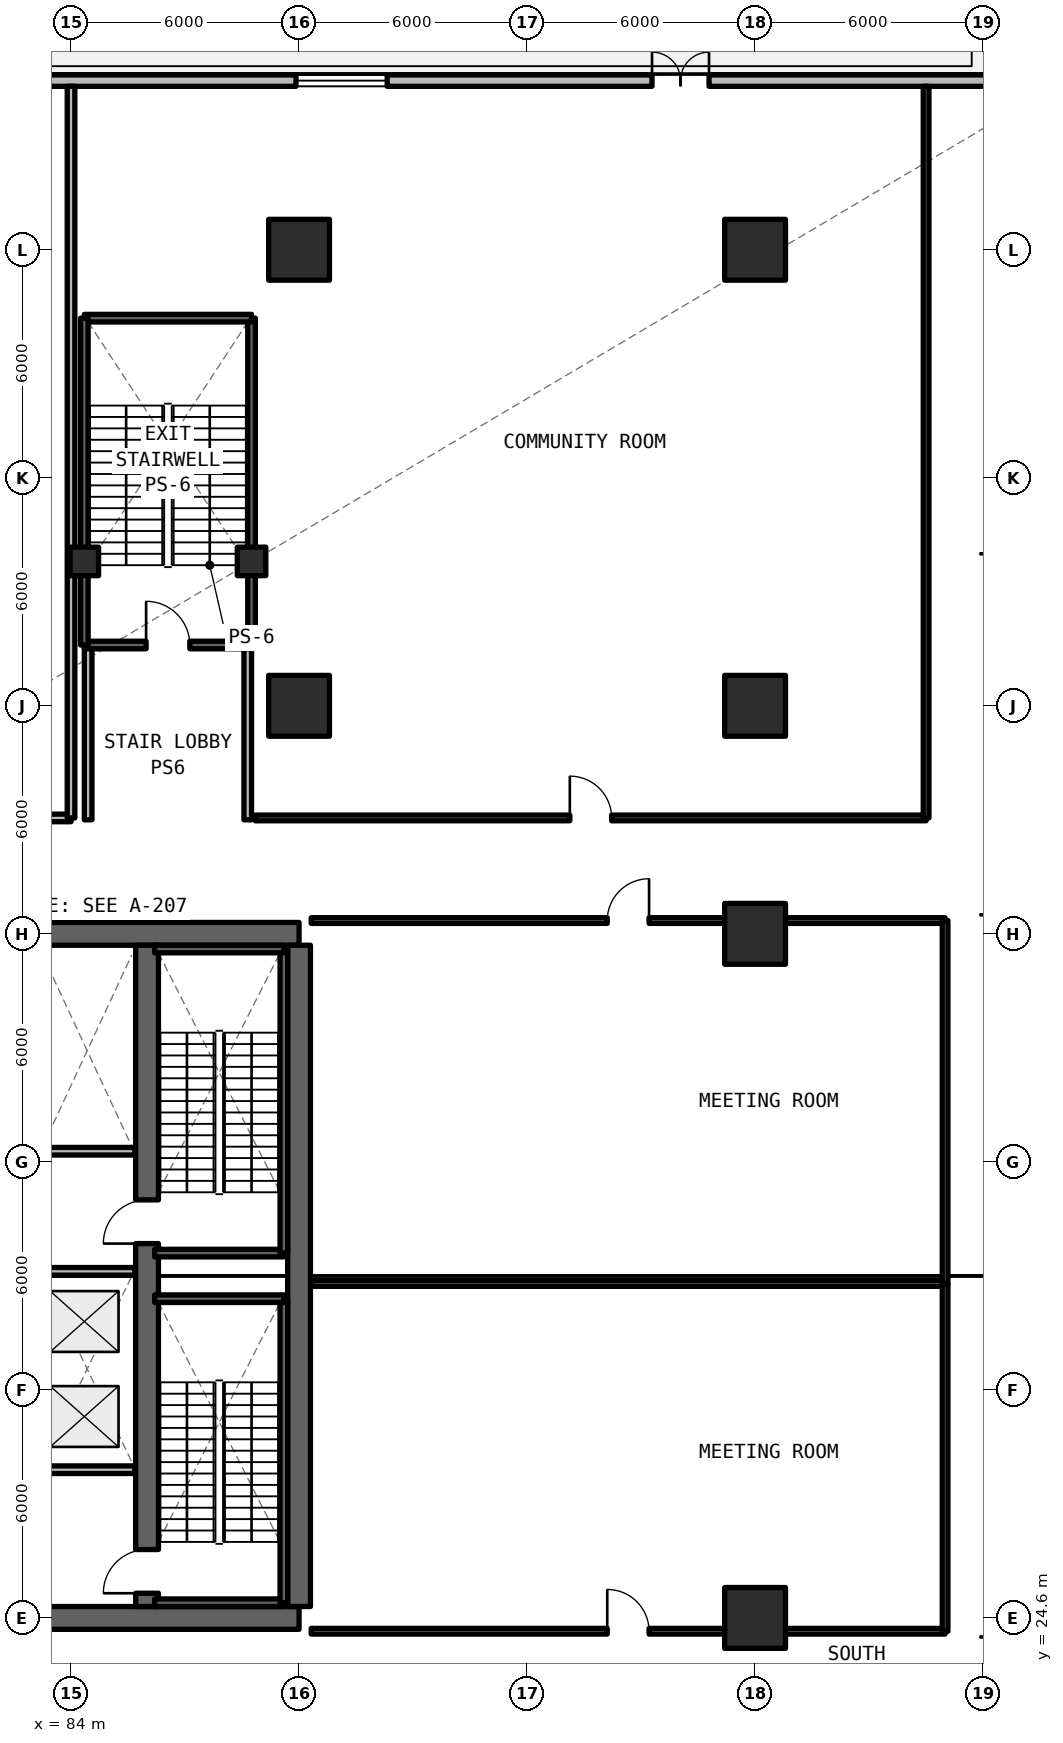
"""IFC4 building model, lengths in metres.
Left out: names, types, materials, properties, quantities, classifications, styles, units other than length and angle.
Written with IfcOpenShell. Run it as: python <this file> out.ifc"""

import sys

from ifc_helpers import new_model, si_unit, direction, frame, frame_2d, origin, origin_2d, place, context, subcontext, project, spatial, rectangle, extrude, element, fill, save


model = new_model("IFC4")
c1 = context("Model", 3, precision=1e-05, world=origin(), true_north=direction((0.0, 1.0)))
c2 = subcontext(c1, "Body", "Model", "MODEL_VIEW")
j1 = project(units=[si_unit("LENGTHUNIT", "METRE"), si_unit("PLANEANGLEUNIT", "RADIAN")], contexts=[c1])
p1 = place(None, origin())
s1 = spatial("IfcSite", under=j1, at=p1, CompositionType="ELEMENT")
p2 = place(p1, origin())
s2 = spatial("IfcBuilding", under=s1, at=p2, CompositionType="ELEMENT")
p3 = place(p2, frame((0.0, 0.0, 9.9)))
s3 = spatial("IfcBuildingStorey", under=s2, at=p3, CompositionType="ELEMENT", Elevation=9.9)
for number, where, z_axis, x_axis in (
    (1, (78.0, 24.6, 0.0), (0.0, 0.0, 1.0), (1.0, 0.0, 0.0)),
    (2, (90.0, 42.6, 0.0), (0.0, 0.0, 1.0), (-1.0, 0.0, 0.0)),
):
    element("IfcWall", number, at=place(p3, frame(where, z_axis=z_axis, x_axis=x_axis)), inside=s3, PredefinedType="SHEAR", context=c2, shape_type="SweptSolid", body=[
        extrude(rectangle(XDim=12.0, YDim=0.6, at=frame_2d((6.0, 0.0))), origin(), (0.0, 0.0, 1.0), 4.95),
    ])
p4 = place(p3, frame((90.0, 24.9, 0.0), z_axis=(0.0, 0.0, 1.0), x_axis=(0.0, 1.0, 0.0)))
e3 = element("IfcWall", 3, at=p4, inside=s3, PredefinedType="SHEAR", context=c2, shape_type="SweptSolid", body=[
    extrude(rectangle(XDim=17.4, YDim=0.6, at=frame_2d((8.7, 0.0))), origin(), (0.0, 0.0, 1.0), 4.95),
])
p5 = place(p3, frame((86.0, 24.9, 0.0), z_axis=(0.0, 0.0, 1.0), x_axis=(0.0, 1.0, 0.0)))
e4 = element("IfcWall", 4, at=p5, inside=s3, PredefinedType="SHEAR", context=c2, shape_type="SweptSolid", body=[
    extrude(rectangle(XDim=17.4, YDim=0.6, at=frame_2d((8.7, 0.0))), origin(), (0.0, 0.0, 1.0), 4.95),
])
p6 = place(p5, frame((0.35, 0.0, 0.0)))
e5 = element("IfcOpeningElement", 5, at=p6, cuts=e4, PredefinedType="OPENING", context=c2, shape_type="SweptSolid", body=[
    extrude(rectangle(XDim=1.15, YDim=2.15, at=frame_2d((0.575, 1.075))), frame((0.0, 0.31, 0.0), z_axis=(0.0, -1.0, 0.0), x_axis=(1.0, 0.0, 0.0)), (0.0, 0.0, 1.0), 0.62),
])
p7 = place(p5, frame((9.55, 0.0, 0.0)))
e6 = element("IfcOpeningElement", 6, at=p7, cuts=e4, PredefinedType="OPENING", context=c2, shape_type="SweptSolid", body=[
    extrude(rectangle(XDim=1.15, YDim=2.15, at=frame_2d((0.575, 1.075))), frame((0.0, 0.31, 0.0), z_axis=(0.0, -1.0, 0.0), x_axis=(1.0, 0.0, 0.0)), (0.0, 0.0, 1.0), 0.62),
])
for number, where, z_axis, x_axis in (
    (7, (90.0, 60.6, 0.0), (0.0, 0.0, 1.0), (1.0, 0.0, 0.0)),
    (8, (102.0, 24.6, 0.0), (0.0, 0.0, 1.0), (1.0, 0.0, 0.0)),
    (9, (102.0, 42.6, 0.0), (0.0, 0.0, 1.0), (1.0, 0.0, 0.0)),
    (10, (102.0, 60.6, 0.0), (0.0, 0.0, 1.0), (1.0, 0.0, 0.0)),
    (11, (90.0, 48.6, 0.0), (0.0, 0.0, 1.0), (1.0, 0.0, 0.0)),
    (12, (102.0, 48.6, 0.0), (0.0, 0.0, 1.0), (1.0, 0.0, 0.0)),
):
    element("IfcColumn", number, at=place(p3, frame(where, z_axis=z_axis, x_axis=x_axis)), inside=s3, PredefinedType="COLUMN", context=c2, shape_type="SweptSolid", body=[
        extrude(rectangle(XDim=1.6, YDim=1.6, at=origin_2d()), origin(), (0.0, 0.0, 1.0), 4.95),
    ])
for number, where, z_axis, x_axis in (
    (13, (84.35, 52.4, 0.0), (0.0, 0.0, 1.0), (1.0, 0.0, 0.0)),
    (14, (88.75, 52.4, 0.0), (0.0, 0.0, 1.0), (1.0, 0.0, 0.0)),
):
    element("IfcColumn", number, at=place(p3, frame(where, z_axis=z_axis, x_axis=x_axis)), inside=s3, PredefinedType="COLUMN", context=c2, shape_type="SweptSolid", body=[
        extrude(rectangle(XDim=0.75, YDim=0.75, at=origin_2d()), origin(), (0.0, 0.0, 1.0), 4.95),
    ])
p8 = place(p3, frame((108.538, 65.05, 0.0), z_axis=(0.0, 0.0, 1.0), x_axis=(-1.0, 0.0, 0.0)))
e15 = element("IfcWall", 15, at=p8, inside=s3, PredefinedType="SOLIDWALL", context=c2, shape_type="SweptSolid", body=[
    extrude(rectangle(XDim=44.338, YDim=0.3, at=frame_2d((22.169, 0.0))), origin(), (0.0, 0.0, 1.0), 4.67),
])
p9 = place(p8, frame((7.75, 0.0, 0.0)))
e16 = element("IfcOpeningElement", 16, at=p9, cuts=e15, PredefinedType="OPENING", context=c2, shape_type="SweptSolid", body=[
    extrude(rectangle(XDim=1.5, YDim=2.2, at=frame_2d((0.75, 1.1))), frame((0.0, 0.16, 0.0), z_axis=(0.0, -1.0, 0.0), x_axis=(1.0, 0.0, 0.0)), (0.0, 0.0, 1.0), 0.32),
])
p10 = place(p8, frame((42.913, 0.0, 0.78)))
e17 = element("IfcOpeningElement", 17, at=p10, cuts=e15, PredefinedType="OPENING", context=c2, shape_type="SweptSolid", body=[
    extrude(rectangle(XDim=0.85, YDim=1.65, at=frame_2d((0.425, 0.825))), frame((0.0, 0.16, 0.0), z_axis=(0.0, -1.0, 0.0), x_axis=(1.0, 0.0, 0.0)), (0.0, 0.0, 1.0), 0.32),
])
p11 = place(p8, frame((29.738, 0.0, 0.78)))
e18 = element("IfcOpeningElement", 18, at=p11, cuts=e15, PredefinedType="OPENING", context=c2, shape_type="SweptSolid", body=[
    extrude(rectangle(XDim=2.4, YDim=1.66, at=frame_2d((1.2, 0.83))), frame((0.0, 0.16, 0.0), z_axis=(0.0, -1.0, 0.0), x_axis=(1.0, 0.0, 0.0)), (0.0, 0.0, 1.0), 0.32),
])
p12 = place(p8, frame((38.638, 0.0, 0.78)))
e19 = element("IfcOpeningElement", 19, at=p12, cuts=e15, PredefinedType="OPENING", context=c2, shape_type="SweptSolid", body=[
    extrude(rectangle(XDim=2.4, YDim=1.66, at=frame_2d((1.2, 0.83))), frame((0.0, 0.16, 0.0), z_axis=(0.0, -1.0, 0.0), x_axis=(1.0, 0.0, 0.0)), (0.0, 0.0, 1.0), 0.32),
])
p13 = place(p8, frame((16.219, 0.0, 0.78)))
e20 = element("IfcOpeningElement", 20, at=p13, cuts=e15, PredefinedType="OPENING", context=c2, shape_type="SweptSolid", body=[
    extrude(rectangle(XDim=2.4, YDim=1.66, at=frame_2d((1.2, 0.83))), frame((0.0, 0.16, 0.0), z_axis=(0.0, -1.0, 0.0), x_axis=(1.0, 0.0, 0.0)), (0.0, 0.0, 1.0), 0.32),
])
p14 = place(p8, frame((25.719, 0.0, 0.78)))
e21 = element("IfcOpeningElement", 21, at=p14, cuts=e15, PredefinedType="OPENING", context=c2, shape_type="SweptSolid", body=[
    extrude(rectangle(XDim=2.4, YDim=1.66, at=frame_2d((1.2, 0.83))), frame((0.0, 0.16, 0.0), z_axis=(0.0, -1.0, 0.0), x_axis=(1.0, 0.0, 0.0)), (0.0, 0.0, 1.0), 0.32),
])
p15 = place(p3, frame((78.32, 28.5, 0.0), z_axis=(0.0, 0.0, 1.0), x_axis=(1.0, 0.0, 0.0)))
e22 = element("IfcWall", 22, at=p15, inside=s3, PredefinedType="SOLIDWALL", context=c2, shape_type="SweptSolid", body=[
    extrude(rectangle(XDim=7.36, YDim=0.2, at=frame_2d((3.68, 0.0))), origin(), (0.0, 0.0, 1.0), 3.89),
])
p16 = place(p15, frame((3.48, 0.0, 0.0)))
e23 = element("IfcOpeningElement", 23, at=p16, cuts=e22, PredefinedType="OPENING", context=c2, shape_type="SweptSolid", body=[
    extrude(rectangle(XDim=1.0, YDim=2.15, at=frame_2d((0.5, 1.075))), frame((0.0, 0.11, 0.0), z_axis=(0.0, -1.0, 0.0), x_axis=(1.0, 0.0, 0.0)), (0.0, 0.0, 1.0), 0.22),
])
for number, where, z_axis, x_axis in (
    (24, (83.2, 33.72, 0.0), (0.0, 0.0, 1.0), (1.0, 0.0, 0.0)),
    (25, (83.2, 36.88, 0.0), (0.0, 0.0, 1.0), (1.0, 0.0, 0.0)),
):
    element("IfcWall", number, at=place(p3, frame(where, z_axis=z_axis, x_axis=x_axis)), inside=s3, PredefinedType="SOLIDWALL", context=c2, shape_type="SweptSolid", body=[
        extrude(rectangle(XDim=2.48, YDim=0.2, at=frame_2d((1.24, 0.0))), origin(), (0.0, 0.0, 1.0), 3.89),
    ])
for number, where, z_axis, x_axis in (
    (26, (84.45, 45.6, 0.0), (0.0, 0.0, 1.0), (0.0, 1.0, 0.0)),
    (27, (88.65, 45.6, 0.0), (0.0, 0.0, 1.0), (0.0, 1.0, 0.0)),
):
    element("IfcWall", number, at=place(p3, frame(where, z_axis=z_axis, x_axis=x_axis)), inside=s3, PredefinedType="SOLIDWALL", context=c2, shape_type="SweptSolid", body=[
        extrude(rectangle(XDim=4.6, YDim=0.2, at=frame_2d((2.3, 0.0))), origin(), (0.0, 0.0, 1.0), 3.89),
    ])
p17 = place(p3, frame((71.2, 45.65, 0.0), z_axis=(0.0, 0.0, 1.0), x_axis=(1.0, 0.0, 0.0)))
e28 = element("IfcWall", 28, at=p17, inside=s3, PredefinedType="SOLIDWALL", context=c2, shape_type="SweptSolid", body=[
    extrude(rectangle(XDim=12.8, YDim=0.2, at=frame_2d((6.4, 0.0))), origin(), (0.0, 0.0, 1.0), 3.89),
])
p18 = place(p17, frame((5.9, 0.0, 0.0)))
e29 = element("IfcOpeningElement", 29, at=p18, cuts=e28, PredefinedType="OPENING", context=c2, shape_type="SweptSolid", body=[
    extrude(rectangle(XDim=1.0, YDim=2.15, at=frame_2d((0.5, 1.075))), frame((0.0, 0.11, 0.0), z_axis=(0.0, -1.0, 0.0), x_axis=(1.0, 0.0, 0.0)), (0.0, 0.0, 1.0), 0.22),
])
p19 = place(p3, frame((84.0, 45.65, 0.0), z_axis=(0.0, 0.0, 1.0), x_axis=(0.0, 1.0, 0.0)))
e30 = element("IfcWall", 30, at=p19, inside=s3, PredefinedType="SOLIDWALL", context=c2, shape_type="SweptSolid", body=[
    extrude(rectangle(XDim=19.25, YDim=0.2, at=frame_2d((9.625, 0.0))), origin(), (0.0, 0.0, 1.0), 3.89),
])
p20 = place(p3, frame((90.32, 24.25, 0.0), z_axis=(0.0, 0.0, 1.0), x_axis=(1.0, 0.0, 0.0)))
e31 = element("IfcWall", 31, at=p20, inside=s3, PredefinedType="SOLIDWALL", context=c2, shape_type="SweptSolid", body=[
    extrude(rectangle(XDim=16.68, YDim=0.15, at=frame_2d((8.34, 0.0))), origin(), (0.0, 0.0, 1.0), 3.89),
])
p21 = place(p20, frame((7.79, 0.0, 0.0)))
e32 = element("IfcOpeningElement", 32, at=p21, cuts=e31, PredefinedType="OPENING", context=c2, shape_type="SweptSolid", body=[
    extrude(rectangle(XDim=1.1, YDim=2.15, at=frame_2d((0.55, 1.075))), frame((0.0, 0.085, 0.0), z_axis=(0.0, -1.0, 0.0), x_axis=(1.0, 0.0, 0.0)), (0.0, 0.0, 1.0), 0.17),
])
p22 = place(p3, frame((90.32, 33.4, 0.0), z_axis=(0.0, 0.0, 1.0), x_axis=(1.0, 0.0, 0.0)))
e33 = element("IfcWall", 33, at=p22, inside=s3, PredefinedType="SOLIDWALL", context=c2, shape_type="SweptSolid", body=[
    extrude(rectangle(XDim=16.68, YDim=0.15, at=frame_2d((8.34, 0.0))), origin(), (0.0, 0.0, 1.0), 3.89),
])
p23 = place(p3, frame((107.0, 24.25, 0.0), z_axis=(0.0, 0.0, 1.0), x_axis=(0.0, 1.0, 0.0)))
e34 = element("IfcWall", 34, at=p23, inside=s3, PredefinedType="SOLIDWALL", context=c2, shape_type="SweptSolid", body=[
    extrude(rectangle(XDim=9.15, YDim=0.15, at=frame_2d((4.575, 0.0))), origin(), (0.0, 0.0, 1.0), 3.89),
])
p24 = place(p3, frame((90.32, 42.95, 0.0), z_axis=(0.0, 0.0, 1.0), x_axis=(1.0, 0.0, 0.0)))
e35 = element("IfcWall", 35, at=p24, inside=s3, PredefinedType="SOLIDWALL", context=c2, shape_type="SweptSolid", body=[
    extrude(rectangle(XDim=16.68, YDim=0.15, at=frame_2d((8.34, 0.0))), origin(), (0.0, 0.0, 1.0), 3.89),
])
p25 = place(p24, frame((7.79, 0.0, 0.0)))
e36 = element("IfcOpeningElement", 36, at=p25, cuts=e35, PredefinedType="OPENING", context=c2, shape_type="SweptSolid", body=[
    extrude(rectangle(XDim=1.1, YDim=2.15, at=frame_2d((0.55, 1.075))), frame((0.0, 0.085, 0.0), z_axis=(0.0, -1.0, 0.0), x_axis=(1.0, 0.0, 0.0)), (0.0, 0.0, 1.0), 0.17),
])
p26 = place(p3, frame((107.0, 33.4, 0.0), z_axis=(0.0, 0.0, 1.0), x_axis=(0.0, 1.0, 0.0)))
e37 = element("IfcWall", 37, at=p26, inside=s3, PredefinedType="SOLIDWALL", context=c2, shape_type="SweptSolid", body=[
    extrude(rectangle(XDim=9.55, YDim=0.15, at=frame_2d((4.775, 0.0))), origin(), (0.0, 0.0, 1.0), 3.89),
])
p27 = place(p3, frame((88.85, 45.65, 0.0), z_axis=(0.0, 0.0, 1.0), x_axis=(1.0, 0.0, 0.0)))
e38 = element("IfcWall", 38, at=p27, inside=s3, PredefinedType="SOLIDWALL", context=c2, shape_type="SweptSolid", body=[
    extrude(rectangle(XDim=17.65, YDim=0.15, at=frame_2d((8.825, 0.0))), origin(), (0.0, 0.0, 1.0), 3.89),
])
p28 = place(p27, frame((8.275, 0.0, 0.0)))
e39 = element("IfcOpeningElement", 39, at=p28, cuts=e38, PredefinedType="OPENING", context=c2, shape_type="SweptSolid", body=[
    extrude(rectangle(XDim=1.1, YDim=2.15, at=frame_2d((0.55, 1.075))), frame((0.0, 0.085, 0.0), z_axis=(0.0, -1.0, 0.0), x_axis=(1.0, 0.0, 0.0)), (0.0, 0.0, 1.0), 0.17),
])
p29 = place(p3, frame((106.5, 45.65, 0.0), z_axis=(0.0, 0.0, 1.0), x_axis=(0.0, 1.0, 0.0)))
e40 = element("IfcWall", 40, at=p29, inside=s3, PredefinedType="SOLIDWALL", context=c2, shape_type="SweptSolid", body=[
    extrude(rectangle(XDim=19.25, YDim=0.15, at=frame_2d((9.625, 0.0))), origin(), (0.0, 0.0, 1.0), 3.89),
])
p30 = place(p3, frame((86.2, 25.0, 0.0), z_axis=(0.0, 0.0, 1.0), x_axis=(1.0, 0.0, 0.0)))
e41 = element("IfcWall", 41, at=p30, inside=s3, PredefinedType="SOLIDWALL", context=c2, shape_type="SweptSolid", body=[
    extrude(rectangle(XDim=3.4, YDim=0.2, at=frame_2d((1.7, 0.0))), origin(), (0.0, 0.0, 1.0), 4.95),
])
p31 = place(p3, frame((89.6, 25.0, 0.0), z_axis=(0.0, 0.0, 1.0), x_axis=(0.0, 1.0, 0.0)))
e42 = element("IfcWall", 42, at=p31, inside=s3, PredefinedType="SOLIDWALL", context=c2, shape_type="SweptSolid", body=[
    extrude(rectangle(XDim=8.0, YDim=0.2, at=frame_2d((4.0, 0.0))), origin(), (0.0, 0.0, 1.0), 4.95),
])
for number, where, z_axis, x_axis in (
    (43, (89.6, 33.0, 0.0), (0.0, 0.0, 1.0), (-1.0, 0.0, 0.0)),
    (44, (86.2, 34.2, 0.0), (0.0, 0.0, 1.0), (1.0, 0.0, 0.0)),
):
    element("IfcWall", number, at=place(p3, frame(where, z_axis=z_axis, x_axis=x_axis)), inside=s3, PredefinedType="SOLIDWALL", context=c2, shape_type="SweptSolid", body=[
        extrude(rectangle(XDim=3.4, YDim=0.2, at=frame_2d((1.7, 0.0))), origin(), (0.0, 0.0, 1.0), 4.95),
    ])
p32 = place(p3, frame((89.6, 34.2, 0.0), z_axis=(0.0, 0.0, 1.0), x_axis=(0.0, 1.0, 0.0)))
e45 = element("IfcWall", 45, at=p32, inside=s3, PredefinedType="SOLIDWALL", context=c2, shape_type="SweptSolid", body=[
    extrude(rectangle(XDim=8.0, YDim=0.2, at=frame_2d((4.0, 0.0))), origin(), (0.0, 0.0, 1.0), 4.95),
])
p33 = place(p3, frame((89.6, 42.2, 0.0), z_axis=(0.0, 0.0, 1.0), x_axis=(-1.0, 0.0, 0.0)))
e46 = element("IfcWall", 46, at=p33, inside=s3, PredefinedType="SOLIDWALL", context=c2, shape_type="SweptSolid", body=[
    extrude(rectangle(XDim=3.4, YDim=0.2, at=frame_2d((1.7, 0.0))), origin(), (0.0, 0.0, 1.0), 4.95),
])
p34 = place(p3, frame((84.35, 50.2, 0.0), z_axis=(0.0, 0.0, 1.0), x_axis=(1.0, 0.0, 0.0)))
e47 = element("IfcWall", 47, at=p34, inside=s3, PredefinedType="SOLIDWALL", context=c2, shape_type="SweptSolid", body=[
    extrude(rectangle(XDim=4.4, YDim=0.2, at=frame_2d((2.2, 0.0))), origin(), (0.0, 0.0, 1.0), 4.95),
])
p35 = place(p34, frame((1.625, 0.0, 0.0)))
e48 = element("IfcOpeningElement", 48, at=p35, cuts=e47, PredefinedType="OPENING", context=c2, shape_type="SweptSolid", body=[
    extrude(rectangle(XDim=1.15, YDim=2.15, at=frame_2d((0.575, 1.075))), frame((0.0, 0.11, 0.0), z_axis=(0.0, -1.0, 0.0), x_axis=(1.0, 0.0, 0.0)), (0.0, 0.0, 1.0), 0.22),
])
p36 = place(p3, frame((88.75, 50.2, 0.0), z_axis=(0.0, 0.0, 1.0), x_axis=(0.0, 1.0, 0.0)))
e49 = element("IfcWall", 49, at=p36, inside=s3, PredefinedType="SOLIDWALL", context=c2, shape_type="SweptSolid", body=[
    extrude(rectangle(XDim=8.6, YDim=0.2, at=frame_2d((4.3, 0.0))), origin(), (0.0, 0.0, 1.0), 4.95),
])
p37 = place(p3, frame((88.75, 58.8, 0.0), z_axis=(0.0, 0.0, 1.0), x_axis=(-1.0, 0.0, 0.0)))
e50 = element("IfcWall", 50, at=p37, inside=s3, PredefinedType="SOLIDWALL", context=c2, shape_type="SweptSolid", body=[
    extrude(rectangle(XDim=4.4, YDim=0.2, at=frame_2d((2.2, 0.0))), origin(), (0.0, 0.0, 1.0), 4.95),
])
p38 = place(p3, frame((84.35, 58.8, 0.0), z_axis=(0.0, 0.0, 1.0), x_axis=(0.0, -1.0, 0.0)))
e51 = element("IfcWall", 51, at=p38, inside=s3, PredefinedType="SOLIDWALL", context=c2, shape_type="SweptSolid", body=[
    extrude(rectangle(XDim=8.6, YDim=0.2, at=frame_2d((4.3, 0.0))), origin(), (0.0, 0.0, 1.0), 4.95),
])
p39 = place(p9, frame((1.5, 0.0, 0.0), z_axis=(0.0, 0.0, 1.0), x_axis=(-1.0, 0.0, 0.0)))
e52 = element("IfcDoor", 52, at=p39, inside=s3, OperationType="SINGLE_SWING_LEFT", PredefinedType="DOOR", context=c2, shape_type="SweptSolid", body=[
    extrude(rectangle(XDim=1.5, YDim=2.2, at=frame_2d((0.75, 1.1))), frame((0.0, 0.025, 0.0), z_axis=(0.0, -1.0, 0.0), x_axis=(1.0, 0.0, 0.0)), (0.0, 0.0, 1.0), 0.05),
])
fill(e16, e52)
p40 = place(p13, origin())
e53 = element("IfcWindow", 53, at=p40, inside=s3, PartitioningType="SINGLE_PANEL", PredefinedType="WINDOW", context=c2, shape_type="SweptSolid", body=[
    extrude(rectangle(XDim=2.4, YDim=1.66, at=frame_2d((1.2, 0.83))), frame((0.0, 0.03, 0.0), z_axis=(0.0, -1.0, 0.0), x_axis=(1.0, 0.0, 0.0)), (0.0, 0.0, 1.0), 0.06),
])
fill(e20, e53)
p41 = place(p21, origin())
e54 = element("IfcDoor", 54, at=p41, inside=s3, OperationType="SINGLE_SWING_LEFT", PredefinedType="DOOR", context=c2, shape_type="SweptSolid", body=[
    extrude(rectangle(XDim=1.1, YDim=2.15, at=frame_2d((0.55, 1.075))), frame((0.0, 0.025, 0.0), z_axis=(0.0, -1.0, 0.0), x_axis=(1.0, 0.0, 0.0)), (0.0, 0.0, 1.0), 0.05),
])
fill(e32, e54)
p42 = place(p25, origin())
e55 = element("IfcDoor", 55, at=p42, inside=s3, OperationType="SINGLE_SWING_RIGHT", PredefinedType="DOOR", context=c2, shape_type="SweptSolid", body=[
    extrude(rectangle(XDim=1.1, YDim=2.15, at=frame_2d((0.55, 1.075))), frame((0.0, 0.025, 0.0), z_axis=(0.0, -1.0, 0.0), x_axis=(1.0, 0.0, 0.0)), (0.0, 0.0, 1.0), 0.05),
])
fill(e36, e55)
p43 = place(p28, origin())
e56 = element("IfcDoor", 56, at=p43, inside=s3, OperationType="SINGLE_SWING_LEFT", PredefinedType="DOOR", context=c2, shape_type="SweptSolid", body=[
    extrude(rectangle(XDim=1.1, YDim=2.15, at=frame_2d((0.55, 1.075))), frame((0.0, 0.025, 0.0), z_axis=(0.0, -1.0, 0.0), x_axis=(1.0, 0.0, 0.0)), (0.0, 0.0, 1.0), 0.05),
])
fill(e39, e56)
p44 = place(p6, origin())
e57 = element("IfcDoor", 57, at=p44, inside=s3, OperationType="SINGLE_SWING_RIGHT", PredefinedType="DOOR", context=c2, shape_type="SweptSolid", body=[
    extrude(rectangle(XDim=1.15, YDim=2.15, at=frame_2d((0.575, 1.075))), frame((0.0, 0.025, 0.0), z_axis=(0.0, -1.0, 0.0), x_axis=(1.0, 0.0, 0.0)), (0.0, 0.0, 1.0), 0.05),
])
fill(e5, e57)
p45 = place(p7, origin())
e58 = element("IfcDoor", 58, at=p45, inside=s3, OperationType="SINGLE_SWING_LEFT", PredefinedType="DOOR", context=c2, shape_type="SweptSolid", body=[
    extrude(rectangle(XDim=1.15, YDim=2.15, at=frame_2d((0.575, 1.075))), frame((0.0, 0.025, 0.0), z_axis=(0.0, -1.0, 0.0), x_axis=(1.0, 0.0, 0.0)), (0.0, 0.0, 1.0), 0.05),
])
fill(e6, e58)
p46 = place(p35, origin())
e59 = element("IfcDoor", 59, at=p46, inside=s3, OperationType="SINGLE_SWING_LEFT", PredefinedType="DOOR", context=c2, shape_type="SweptSolid", body=[
    extrude(rectangle(XDim=1.15, YDim=2.15, at=frame_2d((0.575, 1.075))), frame((0.0, 0.025, 0.0), z_axis=(0.0, -1.0, 0.0), x_axis=(1.0, 0.0, 0.0)), (0.0, 0.0, 1.0), 0.05),
])
fill(e48, e59)
save(model, sys.argv[1])
